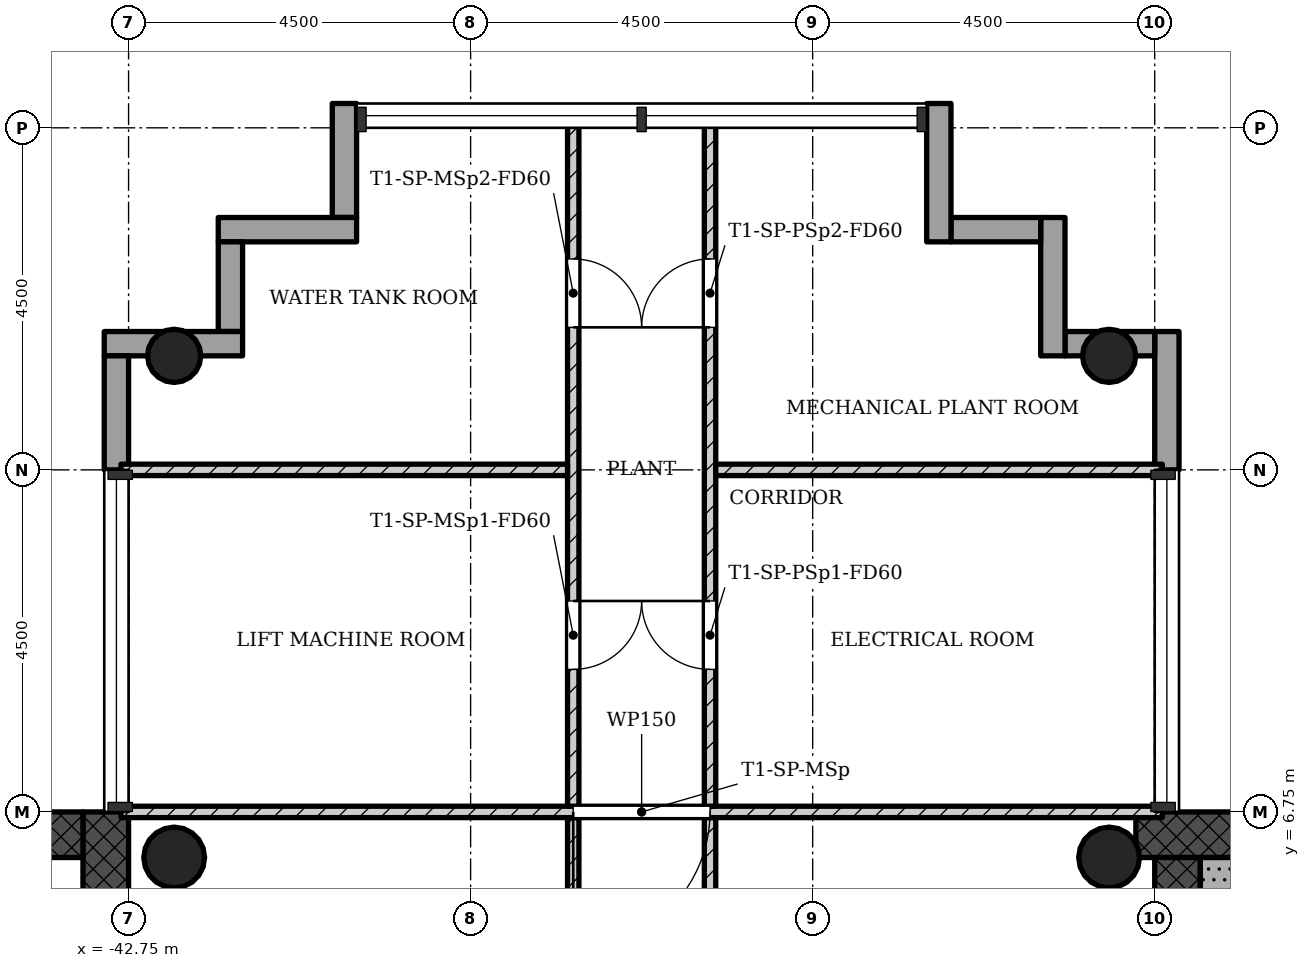
"""IFC4 building model, lengths in metres.
Left out: names, types, materials, properties, quantities, classifications, styles, units other than length and angle.
Written with IfcOpenShell. Run it as: python <this file> out.ifc"""

import sys

from ifc_helpers import new_model, si_unit, direction, frame, frame_2d, origin, origin_2d, place, context, subcontext, project, spatial, rectangle, hollow_circle, extrude, element, fill, save


model = new_model("IFC4")
c1 = context("Model", 3, precision=1e-05, world=origin(), true_north=direction((0.0, 1.0)))
c2 = subcontext(c1, "Body", "Model", "MODEL_VIEW")
j1 = project(units=[si_unit("LENGTHUNIT", "METRE"), si_unit("PLANEANGLEUNIT", "RADIAN")], contexts=[c1])
p1 = place(None, origin())
s1 = spatial("IfcSite", under=j1, at=p1, CompositionType="ELEMENT")
p2 = place(p1, origin())
s2 = spatial("IfcBuilding", under=s1, at=p2, CompositionType="ELEMENT")
p3 = place(p2, frame((0.0, 0.0, 233.4)))
s3 = spatial("IfcBuildingStorey", under=s2, at=p3, CompositionType="ELEMENT", Elevation=233.4)
p4 = place(p3, frame((-20.85, 6.45, 0.0), z_axis=(0.0, 0.0, 1.0), x_axis=(-1.0, 0.0, 0.0)))
e1 = element("IfcWall", 1, at=p4, inside=s3, PredefinedType="SHEAR", context=c2, shape_type="SweptSolid", body=[
    extrude(rectangle(XDim=8.648, YDim=0.6, at=frame_2d((4.324, 0.0))), origin(), (0.0, 0.0, 1.0), 4.5),
])
p5 = place(p3, frame((-28.95, 6.15, 0.0), z_axis=(0.0, 0.0, 1.0), x_axis=(0.0, -1.0, 0.0)))
e2 = element("IfcWall", 2, at=p5, inside=s3, PredefinedType="SHEAR", context=c2, shape_type="SweptSolid", body=[
    extrude(rectangle(XDim=12.9, YDim=0.6, at=frame_2d((6.45, 0.0))), origin(), (0.0, 0.0, 1.0), 4.5),
])
p6 = place(p5, frame((5.25, 0.0, 0.0)))
e3 = element("IfcOpeningElement", 3, at=p6, cuts=e2, PredefinedType="OPENING", context=c2, shape_type="SweptSolid", body=[
    extrude(rectangle(XDim=1.8, YDim=2.1, at=frame_2d((0.9, 1.05))), frame((0.0, 0.31, 0.0), z_axis=(0.0, -1.0, 0.0), x_axis=(1.0, 0.0, 0.0)), (0.0, 0.0, 1.0), 0.62),
])
p7 = place(p3, frame((-43.05, -6.15, 0.0), z_axis=(0.0, 0.0, 1.0), x_axis=(0.0, 1.0, 0.0)))
e4 = element("IfcWall", 4, at=p7, inside=s3, PredefinedType="SHEAR", context=c2, shape_type="SweptSolid", body=[
    extrude(rectangle(XDim=12.9, YDim=0.6, at=frame_2d((6.45, 0.0))), origin(), (0.0, 0.0, 1.0), 4.5),
])
p8 = place(p7, frame((5.25, 0.0, 0.0)))
e5 = element("IfcOpeningElement", 5, at=p8, cuts=e4, PredefinedType="OPENING", context=c2, shape_type="SweptSolid", body=[
    extrude(rectangle(XDim=1.8, YDim=2.1, at=frame_2d((0.9, 1.05))), frame((0.0, 0.31, 0.0), z_axis=(0.0, -1.0, 0.0), x_axis=(1.0, 0.0, 0.0)), (0.0, 0.0, 1.0), 0.62),
])
p9 = place(p3, frame((-43.35, 6.45, 0.0), z_axis=(0.0, 0.0, 1.0), x_axis=(-1.0, 0.0, 0.0)))
e6 = element("IfcWall", 6, at=p9, inside=s3, PredefinedType="SHEAR", context=c2, shape_type="SweptSolid", body=[
    extrude(rectangle(XDim=8.4, YDim=0.6, at=frame_2d((4.2, 0.0))), origin(), (0.0, 0.0, 1.0), 4.5),
])
for number, where, z_axis, x_axis in (
    (7, (-29.85, 12.75, 0.0), (0.0, 0.0, 1.0), (1.0, 0.0, 0.0)),
    (8, (-42.15, 12.75, 0.0), (0.0, 0.0, 1.0), (1.0, 0.0, 0.0)),
):
    element("IfcColumn", number, at=place(p3, frame(where, z_axis=z_axis, x_axis=x_axis)), inside=s3, PredefinedType="COLUMN", context=c2, shape_type="SweptSolid", body=[
        extrude(hollow_circle(Radius=0.35, WallThickness=0.025, at=origin_2d()), origin(), (0.0, 0.0, 1.0), 4.5),
    ])
for number, where, z_axis, x_axis in (
    (9, (-29.85, 6.15, 0.0), (0.0, 0.0, 1.0), (1.0, 0.0, 0.0)),
    (10, (-42.15, 6.15, 0.0), (0.0, 0.0, 1.0), (1.0, 0.0, 0.0)),
):
    element("IfcColumn", number, at=place(p3, frame(where, z_axis=z_axis, x_axis=x_axis)), inside=s3, PredefinedType="COLUMN", context=c2, shape_type="SweptSolid", body=[
        extrude(hollow_circle(Radius=0.4, WallThickness=0.028, at=origin_2d()), origin(), (0.0, 0.0, 1.0), 4.5),
    ])
p10 = place(p3, frame((-29.09, 11.25, -0.3), z_axis=(0.0, 0.0, 1.0), x_axis=(0.0, 1.0, 0.0)))
e11 = element("IfcWall", 11, at=p10, inside=s3, PredefinedType="STANDARD", context=c2, shape_type="SweptSolid", body=[
    extrude(rectangle(XDim=1.82, YDim=0.32, at=frame_2d((0.91, 0.0))), origin(), (0.0, 0.0, 1.0), 4.5),
])
p11 = place(p3, frame((-29.25, 12.91, -0.3), z_axis=(0.0, 0.0, 1.0), x_axis=(-1.0, 0.0, 0.0)))
e12 = element("IfcWall", 12, at=p11, inside=s3, PredefinedType="STANDARD", context=c2, shape_type="SweptSolid", body=[
    extrude(rectangle(XDim=1.18, YDim=0.32, at=frame_2d((0.59, 0.0))), origin(), (0.0, 0.0, 1.0), 4.5),
])
p12 = place(p3, frame((-30.59, 12.75, -0.3), z_axis=(0.0, 0.0, 1.0), x_axis=(0.0, 1.0, 0.0)))
e13 = element("IfcWall", 13, at=p12, inside=s3, PredefinedType="STANDARD", context=c2, shape_type="SweptSolid", body=[
    extrude(rectangle(XDim=1.82, YDim=0.32, at=frame_2d((0.91, 0.0))), origin(), (0.0, 0.0, 1.0), 4.5),
])
p13 = place(p3, frame((-30.75, 14.41, -0.3), z_axis=(0.0, 0.0, 1.0), x_axis=(-1.0, 0.0, 0.0)))
e14 = element("IfcWall", 14, at=p13, inside=s3, PredefinedType="STANDARD", context=c2, shape_type="SweptSolid", body=[
    extrude(rectangle(XDim=1.18, YDim=0.32, at=frame_2d((0.59, 0.0))), origin(), (0.0, 0.0, 1.0), 4.5),
])
p14 = place(p3, frame((-32.09, 14.25, -0.3), z_axis=(0.0, 0.0, 1.0), x_axis=(0.0, 1.0, 0.0)))
e15 = element("IfcWall", 15, at=p14, inside=s3, PredefinedType="STANDARD", context=c2, shape_type="SweptSolid", body=[
    extrude(rectangle(XDim=1.82, YDim=0.32, at=frame_2d((0.91, 0.0))), origin(), (0.0, 0.0, 1.0), 4.5),
])
p15 = place(p3, frame((-39.91, 16.07, -0.3), z_axis=(0.0, 0.0, 1.0), x_axis=(0.0, -1.0, 0.0)))
e16 = element("IfcWall", 16, at=p15, inside=s3, PredefinedType="STANDARD", context=c2, shape_type="SweptSolid", body=[
    extrude(rectangle(XDim=1.5, YDim=0.32, at=frame_2d((0.75, 0.0))), origin(), (0.0, 0.0, 1.0), 4.5),
])
p16 = place(p3, frame((-39.75, 14.41, -0.3), z_axis=(0.0, 0.0, 1.0), x_axis=(-1.0, 0.0, 0.0)))
e17 = element("IfcWall", 17, at=p16, inside=s3, PredefinedType="STANDARD", context=c2, shape_type="SweptSolid", body=[
    extrude(rectangle(XDim=1.82, YDim=0.32, at=frame_2d((0.91, 0.0))), origin(), (0.0, 0.0, 1.0), 4.5),
])
p17 = place(p3, frame((-41.41, 14.25, -0.3), z_axis=(0.0, 0.0, 1.0), x_axis=(0.0, -1.0, 0.0)))
e18 = element("IfcWall", 18, at=p17, inside=s3, PredefinedType="STANDARD", context=c2, shape_type="SweptSolid", body=[
    extrude(rectangle(XDim=1.18, YDim=0.32, at=frame_2d((0.59, 0.0))), origin(), (0.0, 0.0, 1.0), 4.5),
])
p18 = place(p3, frame((-41.25, 12.91, -0.3), z_axis=(0.0, 0.0, 1.0), x_axis=(-1.0, 0.0, 0.0)))
e19 = element("IfcWall", 19, at=p18, inside=s3, PredefinedType="STANDARD", context=c2, shape_type="SweptSolid", body=[
    extrude(rectangle(XDim=1.82, YDim=0.32, at=frame_2d((0.91, 0.0))), origin(), (0.0, 0.0, 1.0), 4.5),
])
p19 = place(p3, frame((-42.91, 12.75, -0.3), z_axis=(0.0, 0.0, 1.0), x_axis=(0.0, -1.0, 0.0)))
e20 = element("IfcWall", 20, at=p19, inside=s3, PredefinedType="STANDARD", context=c2, shape_type="SweptSolid", body=[
    extrude(rectangle(XDim=1.5, YDim=0.32, at=frame_2d((0.75, 0.0))), origin(), (0.0, 0.0, 1.0), 4.5),
])
for number, where, z_axis, x_axis in (
    (21, (-35.1, 0.975, 0.0), (0.0, 0.0, 1.0), (0.0, 1.0, 0.0)),
    (22, (-36.9, 0.975, 0.0), (0.0, 0.0, 1.0), (0.0, 1.0, 0.0)),
):
    element("IfcWall", number, at=place(p3, frame(where, z_axis=z_axis, x_axis=x_axis)), inside=s3, PredefinedType="PARTITIONING", context=c2, shape_type="SweptSolid", body=[
        extrude(rectangle(XDim=5.7, YDim=0.15, at=frame_2d((2.85, 0.0))), origin(), (0.0, 0.0, 1.0), 4.1),
    ])
p20 = place(p3, frame((-42.85, 6.75, 0.0), z_axis=(0.0, 0.0, 1.0), x_axis=(1.0, 0.0, 0.0)))
e23 = element("IfcWall", 23, at=p20, inside=s3, PredefinedType="PARTITIONING", context=c2, shape_type="SweptSolid", body=[
    extrude(rectangle(XDim=13.7, YDim=0.15, at=frame_2d((6.85, 0.0))), origin(), (0.0, 0.0, 1.0), 4.1),
])
p21 = place(p20, frame((5.95, 0.0, 0.0)))
e24 = element("IfcOpeningElement", 24, at=p21, cuts=e23, PredefinedType="OPENING", context=c2, shape_type="SweptSolid", body=[
    extrude(rectangle(XDim=1.8, YDim=2.1, at=frame_2d((0.9, 1.05))), frame((0.0, 0.085, 0.0), z_axis=(0.0, -1.0, 0.0), x_axis=(1.0, 0.0, 0.0)), (0.0, 0.0, 1.0), 0.17),
])
p22 = place(p3, frame((-35.1, 6.825, 0.0), z_axis=(0.0, 0.0, 1.0), x_axis=(0.0, 1.0, 0.0)))
e25 = element("IfcWall", 25, at=p22, inside=s3, PredefinedType="PARTITIONING", context=c2, shape_type="SweptSolid", body=[
    extrude(rectangle(XDim=9.025, YDim=0.15, at=frame_2d((4.513, 0.0))), origin(), (0.0, 0.0, 1.0), 4.1),
])
p23 = place(p22, frame((1.8, 0.0, 0.0)))
e26 = element("IfcOpeningElement", 26, at=p23, cuts=e25, PredefinedType="OPENING", context=c2, shape_type="SweptSolid", body=[
    extrude(rectangle(XDim=0.9, YDim=2.1, at=frame_2d((0.45, 1.05))), frame((0.0, 0.085, 0.0), z_axis=(0.0, -1.0, 0.0), x_axis=(1.0, 0.0, 0.0)), (0.0, 0.0, 1.0), 0.17),
])
p24 = place(p22, frame((6.3, 0.0, 0.0)))
e27 = element("IfcOpeningElement", 27, at=p24, cuts=e25, PredefinedType="OPENING", context=c2, shape_type="SweptSolid", body=[
    extrude(rectangle(XDim=0.9, YDim=2.1, at=frame_2d((0.45, 1.05))), frame((0.0, 0.085, 0.0), z_axis=(0.0, -1.0, 0.0), x_axis=(1.0, 0.0, 0.0)), (0.0, 0.0, 1.0), 0.17),
])
p25 = place(p3, frame((-35.025, 11.25, 0.0), z_axis=(0.0, 0.0, 1.0), x_axis=(1.0, 0.0, 0.0)))
e28 = element("IfcWall", 28, at=p25, inside=s3, PredefinedType="PARTITIONING", context=c2, shape_type="SweptSolid", body=[
    extrude(rectangle(XDim=5.875, YDim=0.15, at=frame_2d((2.938, 0.0))), origin(), (0.0, 0.0, 1.0), 4.1),
])
p26 = place(p3, frame((-36.9, 6.825, 0.0), z_axis=(0.0, 0.0, 1.0), x_axis=(0.0, 1.0, 0.0)))
e29 = element("IfcWall", 29, at=p26, inside=s3, PredefinedType="PARTITIONING", context=c2, shape_type="SweptSolid", body=[
    extrude(rectangle(XDim=9.025, YDim=0.15, at=frame_2d((4.513, 0.0))), origin(), (0.0, 0.0, 1.0), 4.1),
])
p27 = place(p26, frame((1.8, 0.0, 0.0)))
e30 = element("IfcOpeningElement", 30, at=p27, cuts=e29, PredefinedType="OPENING", context=c2, shape_type="SweptSolid", body=[
    extrude(rectangle(XDim=0.9, YDim=2.1, at=frame_2d((0.45, 1.05))), frame((0.0, 0.085, 0.0), z_axis=(0.0, -1.0, 0.0), x_axis=(1.0, 0.0, 0.0)), (0.0, 0.0, 1.0), 0.17),
])
p28 = place(p26, frame((6.3, 0.0, 0.0)))
e31 = element("IfcOpeningElement", 31, at=p28, cuts=e29, PredefinedType="OPENING", context=c2, shape_type="SweptSolid", body=[
    extrude(rectangle(XDim=0.9, YDim=2.1, at=frame_2d((0.45, 1.05))), frame((0.0, 0.085, 0.0), z_axis=(0.0, -1.0, 0.0), x_axis=(1.0, 0.0, 0.0)), (0.0, 0.0, 1.0), 0.17),
])
p29 = place(p3, frame((-36.975, 11.25, 0.0), z_axis=(0.0, 0.0, 1.0), x_axis=(-1.0, 0.0, 0.0)))
e32 = element("IfcWall", 32, at=p29, inside=s3, PredefinedType="PARTITIONING", context=c2, shape_type="SweptSolid", body=[
    extrude(rectangle(XDim=5.875, YDim=0.15, at=frame_2d((2.938, 0.0))), origin(), (0.0, 0.0, 1.0), 4.1),
])
p30 = place(p3, frame((-28.35, 1.85, 0.0), z_axis=(0.0, 0.0, 1.0), x_axis=(0.0, 1.0, 0.0)))
e33 = element("IfcWall", 33, at=p30, inside=s3, PredefinedType="SHEAR", context=c2, shape_type="SweptSolid", body=[
    extrude(rectangle(XDim=4.3, YDim=0.6, at=frame_2d((2.15, 0.0))), origin(), (0.0, 0.0, 1.0), 4.5),
])
p31 = place(p21, origin())
e34 = element("IfcDoor", 34, at=p31, inside=s3, OperationType="SINGLE_SWING_LEFT", PredefinedType="DOOR", context=c2, shape_type="SweptSolid", body=[
    extrude(rectangle(XDim=1.8, YDim=2.1, at=frame_2d((0.9, 1.05))), frame((0.0, 0.025, 0.0), z_axis=(0.0, -1.0, 0.0), x_axis=(1.0, 0.0, 0.0)), (0.0, 0.0, 1.0), 0.05),
])
fill(e24, e34)
p32 = place(p23, origin())
e35 = element("IfcDoor", 35, at=p32, inside=s3, OperationType="SINGLE_SWING_LEFT", PredefinedType="DOOR", context=c2, shape_type="SweptSolid", body=[
    extrude(rectangle(XDim=0.9, YDim=2.1, at=frame_2d((0.45, 1.05))), frame((0.0, 0.025, 0.0), z_axis=(0.0, -1.0, 0.0), x_axis=(1.0, 0.0, 0.0)), (0.0, 0.0, 1.0), 0.05),
])
fill(e26, e35)
p33 = place(p24, origin())
e36 = element("IfcDoor", 36, at=p33, inside=s3, OperationType="SINGLE_SWING_RIGHT", PredefinedType="DOOR", context=c2, shape_type="SweptSolid", body=[
    extrude(rectangle(XDim=0.9, YDim=2.1, at=frame_2d((0.45, 1.05))), frame((0.0, 0.025, 0.0), z_axis=(0.0, -1.0, 0.0), x_axis=(1.0, 0.0, 0.0)), (0.0, 0.0, 1.0), 0.05),
])
fill(e27, e36)
p34 = place(p27, origin())
e37 = element("IfcDoor", 37, at=p34, inside=s3, OperationType="SINGLE_SWING_RIGHT", PredefinedType="DOOR", context=c2, shape_type="SweptSolid", body=[
    extrude(rectangle(XDim=0.9, YDim=2.1, at=frame_2d((0.45, 1.05))), frame((0.0, 0.025, 0.0), z_axis=(0.0, -1.0, 0.0), x_axis=(1.0, 0.0, 0.0)), (0.0, 0.0, 1.0), 0.05),
])
fill(e30, e37)
p35 = place(p28, origin())
e38 = element("IfcDoor", 38, at=p35, inside=s3, OperationType="SINGLE_SWING_LEFT", PredefinedType="DOOR", context=c2, shape_type="SweptSolid", body=[
    extrude(rectangle(XDim=0.9, YDim=2.1, at=frame_2d((0.45, 1.05))), frame((0.0, 0.025, 0.0), z_axis=(0.0, -1.0, 0.0), x_axis=(1.0, 0.0, 0.0)), (0.0, 0.0, 1.0), 0.05),
])
fill(e31, e38)
save(model, sys.argv[1])
